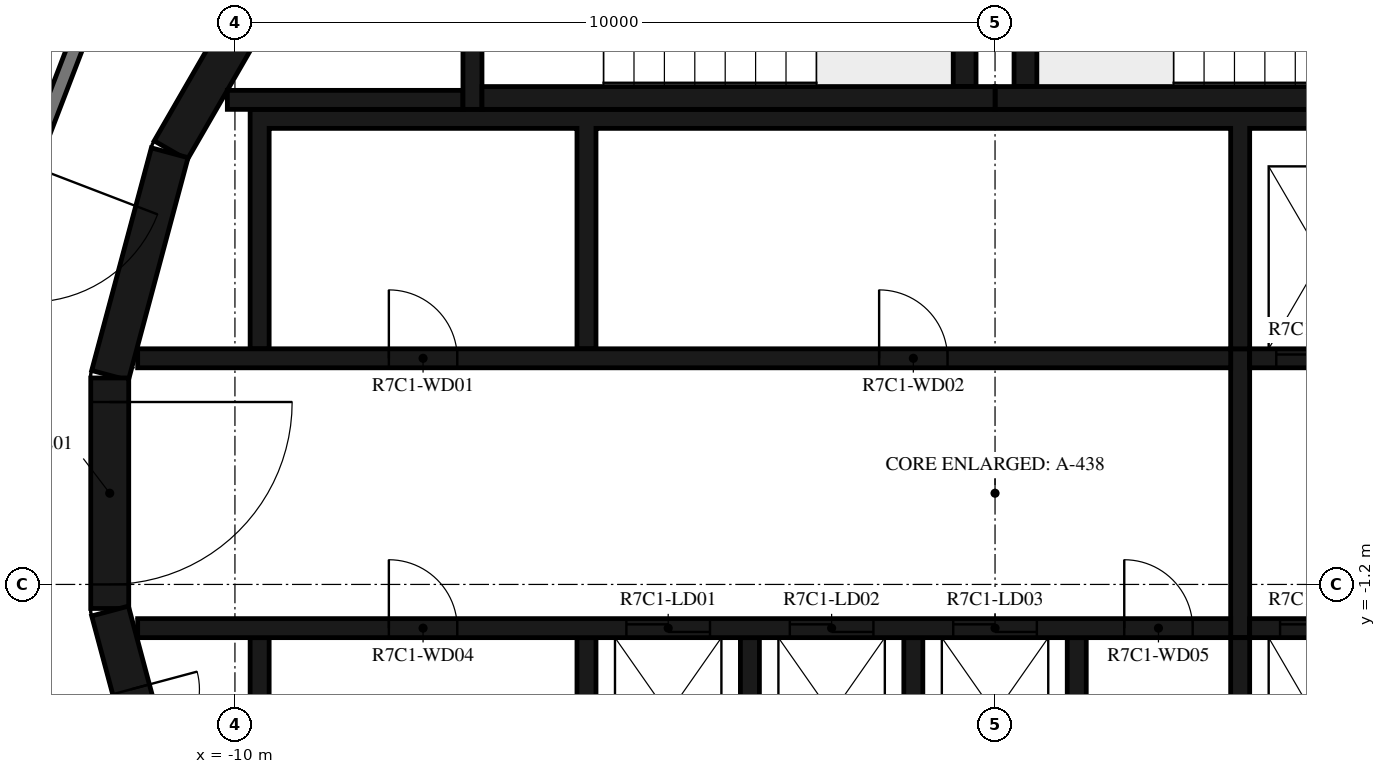
"""IFC4 building model, lengths in metres.
Left out: names, types, materials, properties, quantities, classifications, styles, units other than length and angle.
Written with IfcOpenShell. Run it as: python <this file> out.ifc"""

import sys

from ifc_helpers import new_model, si_unit, direction, frame, frame_2d, origin, place, context, subcontext, project, spatial, polyline, rectangle, outline, extrude, element, fill, save


model = new_model("IFC4")
c1 = context("Model", 3, precision=1e-05, world=origin(), true_north=direction((0.0, 1.0)))
c2 = subcontext(c1, "Body", "Model", "MODEL_VIEW")
j1 = project(units=[si_unit("LENGTHUNIT", "METRE"), si_unit("PLANEANGLEUNIT", "RADIAN")], contexts=[c1])
p1 = place(None, origin())
s1 = spatial("IfcSite", under=j1, at=p1, CompositionType="ELEMENT")
p2 = place(p1, origin())
s2 = spatial("IfcBuilding", under=s1, at=p2, CompositionType="ELEMENT")
p3 = place(p2, frame((0.0, 0.0, 287.9)))
s3 = spatial("IfcBuildingStorey", under=s2, at=p3, CompositionType="ELEMENT", Elevation=287.9)
for number, where, z_axis, x_axis in (
    (1, (-9.329, 7.137, 0.0), (0.0, 0.0, 1.0), (-0.5, -0.866, 0.0)),
    (2, (-10.858, 4.479, 0.0), (0.0, 0.0, 1.0), (-0.259, -0.966, 0.0)),
):
    element("IfcWall", number, at=place(p3, frame(where, z_axis=z_axis, x_axis=x_axis)), inside=s3, PredefinedType="SHEAR", context=c2, shape_type="SweptSolid", body=[
        extrude(rectangle(XDim=3.033, YDim=0.5, at=frame_2d((1.516, 0.0))), origin(), (0.0, 0.0, 1.0), 3.05),
    ])
p4 = place(p3, frame((-11.647, 1.516, 0.0), z_axis=(0.0, 0.0, 1.0), x_axis=(0.0, -1.0, 0.0)))
e3 = element("IfcWall", 3, at=p4, inside=s3, PredefinedType="SHEAR", context=c2, shape_type="SweptSolid", body=[
    extrude(rectangle(XDim=3.033, YDim=0.5, at=frame_2d((1.516, 0.0))), origin(), (0.0, 0.0, 1.0), 3.05),
])
p5 = place(p4, frame((0.316, 0.0, 0.0)))
e4 = element("IfcOpeningElement", 4, at=p5, cuts=e3, PredefinedType="OPENING", context=c2, shape_type="SweptSolid", body=[
    extrude(rectangle(XDim=2.4, YDim=2.1, at=frame_2d((1.2, 1.05))), frame((0.0, 0.26, 0.0), z_axis=(0.0, -1.0, 0.0), x_axis=(1.0, 0.0, 0.0)), (0.0, 0.0, 1.0), 0.52),
])
p6 = place(p3, frame((-11.643, -1.55, 0.0), z_axis=(0.0, 0.0, 1.0), x_axis=(0.258734743916, -0.965948410781, 0.0)))
e5 = element("IfcWall", 5, at=p6, inside=s3, PredefinedType="SHEAR", context=c2, shape_type="SweptSolid", body=[
    extrude(rectangle(XDim=3.033, YDim=0.5, at=frame_2d((1.516, 0.0))), origin(), (0.0, 0.0, 1.0), 3.05),
])
p7 = place(p6, frame((1.066, 0.0, 0.0)))
e6 = element("IfcOpeningElement", 6, at=p7, cuts=e5, PredefinedType="OPENING", context=c2, shape_type="SweptSolid", body=[
    extrude(rectangle(XDim=0.9, YDim=2.1, at=frame_2d((0.45, 1.05))), frame((0.0, 0.26, 0.0), z_axis=(0.0, -1.0, 0.0), x_axis=(1.0, 0.0, 0.0)), (0.0, 0.0, 1.0), 0.52),
])
p8 = place(p3, frame((0.0, 5.2, 0.0), z_axis=(0.0, 0.0, 1.0), x_axis=(1.0, 0.0, 0.0)))
e7 = element("IfcWall", 7, at=p8, inside=s3, PredefinedType="SHEAR", context=c2, shape_type="SweptSolid", body=[
    extrude(rectangle(XDim=6.75, YDim=0.3, at=frame_2d((3.375, 0.0))), origin(), (0.0, 0.0, 1.0), 3.05),
])
p9 = place(p3, frame((0.4, 5.35, 0.0), z_axis=(0.0, 0.0, 1.0), x_axis=(0.0, 1.0, 0.0)))
e8 = element("IfcWall", 8, at=p9, inside=s3, PredefinedType="SHEAR", context=c2, shape_type="SweptSolid", body=[
    extrude(rectangle(XDim=3.32, YDim=0.3, at=frame_2d((1.66, 0.0))), origin(), (0.0, 0.0, 1.0), 3.05),
])
p10 = place(p3, frame((-6.75, 5.2, 0.0), z_axis=(0.0, 0.0, 1.0), x_axis=(1.0, 0.0, 0.0)))
e9 = element("IfcWall", 9, at=p10, inside=s3, PredefinedType="SHEAR", context=c2, shape_type="SweptSolid", body=[
    extrude(rectangle(XDim=6.75, YDim=0.3, at=frame_2d((3.375, 0.0))), origin(), (0.0, 0.0, 1.0), 3.05),
])
p11 = place(p3, frame((-0.4, 5.35, 0.0), z_axis=(0.0, 0.0, 1.0), x_axis=(0.0, 1.0, 0.0)))
e10 = element("IfcWall", 10, at=p11, inside=s3, PredefinedType="SHEAR", context=c2, shape_type="SweptSolid", body=[
    extrude(rectangle(XDim=3.32, YDim=0.3, at=frame_2d((1.66, 0.0))), origin(), (0.0, 0.0, 1.0), 3.05),
])
p12 = place(p3, frame((-6.875, 8.97, 0.0), z_axis=(0.0, 0.0, 1.0), x_axis=(0.0, -1.0, 0.0)))
e11 = element("IfcWall", 11, at=p12, inside=s3, PredefinedType="SHEAR", context=c2, shape_type="SweptSolid", body=[
    extrude(rectangle(XDim=3.92, YDim=0.25, at=frame_2d((1.96, 0.0))), origin(), (0.0, 0.0, 1.0), 3.05),
])
p13 = place(p12, frame((1.61, 0.0, 0.0)))
e12 = element("IfcOpeningElement", 12, at=p13, cuts=e11, PredefinedType="OPENING", context=c2, shape_type="SweptSolid", body=[
    extrude(rectangle(XDim=1.2, YDim=2.1, at=frame_2d((0.6, 1.05))), frame((0.0, 0.135, 0.0), z_axis=(0.0, -1.0, 0.0), x_axis=(1.0, 0.0, 0.0)), (0.0, 0.0, 1.0), 0.27),
])
p14 = place(p3, frame((-7.0, 5.175, 0.0), z_axis=(0.0, 0.0, 1.0), x_axis=(-1.0, 0.0, 0.0)))
e13 = element("IfcWall", 13, at=p14, inside=s3, PredefinedType="SHEAR", context=c2, shape_type="SweptSolid", body=[
    extrude(rectangle(XDim=3.1, YDim=0.25, at=frame_2d((1.55, 0.0))), origin(), (0.0, 0.0, 1.0), 3.05),
])
p15 = place(p3, origin())
e14 = element("IfcWall", 14, at=p15, inside=s3, PredefinedType="SHEAR", context=c2, shape_type="SweptSolid", body=[
    extrude(outline(polyline([(-9.8, 1.9), (-9.55, 1.9), (-9.55, 4.8), (-5.5, 4.8), (-5.5, 1.9), (-5.25, 1.9), (-5.25, 4.8), (3.1, 4.8), (3.1, 1.9), (3.35, 1.9), (3.35, 4.8), (5.25, 4.8), (5.25, 1.9), (5.5, 1.9), (5.5, 4.8), (7.4, 4.8), (7.4, 1.9), (7.65, 1.9), (7.65, 4.8), (9.55, 4.8), (9.55, 1.9), (9.8, 1.9), (9.8, 4.8), (9.8, 5.05), (-9.8, 5.05), (-9.8, 4.8), (-9.8, 1.9)])), origin(), (0.0, 0.0, 1.0), 3.05),
])
p16 = place(p3, origin())
e15 = element("IfcWall", 15, at=p16, inside=s3, PredefinedType="SHEAR", context=c2, shape_type="SweptSolid", body=[
    extrude(outline(polyline([(9.8, -5.05), (9.8, -4.8), (9.8, -1.9), (9.55, -1.9), (9.55, -4.8), (7.65, -4.8), (7.65, -1.9), (7.4, -1.9), (7.4, -4.8), (5.5, -4.8), (5.5, -1.9), (5.25, -1.9), (5.25, -4.8), (3.35, -4.8), (3.35, -1.9), (3.1, -1.9), (3.1, -4.8), (1.2, -4.8), (1.2, -1.9), (0.95, -1.9), (0.95, -4.8), (-0.95, -4.8), (-0.95, -1.9), (-1.2, -1.9), (-1.2, -4.8), (-3.1, -4.8), (-3.1, -1.9), (-3.35, -1.9), (-3.35, -4.8), (-5.25, -4.8), (-5.25, -1.9), (-5.5, -1.9), (-5.5, -4.8), (-9.55, -4.8), (-9.55, -1.9), (-9.8, -1.9), (-9.8, -4.8), (-9.8, -5.05), (9.8, -5.05)])), origin(), (0.0, 0.0, 1.0), 3.05),
])
p17 = place(p3, frame((-11.28, 1.775, 0.0), z_axis=(0.0, 0.0, 1.0), x_axis=(1.0, 0.0, 0.0)))
e16 = element("IfcWall", 16, at=p17, inside=s3, PredefinedType="SHEAR", context=c2, shape_type="SweptSolid", body=[
    extrude(rectangle(XDim=14.38, YDim=0.25, at=frame_2d((7.19, 0.0))), origin(), (0.0, 0.0, 1.0), 3.05),
])
p18 = place(p17, frame((3.305, 0.0, 0.0)))
e17 = element("IfcOpeningElement", 17, at=p18, cuts=e16, PredefinedType="OPENING", context=c2, shape_type="SweptSolid", body=[
    extrude(rectangle(XDim=0.9, YDim=2.1, at=frame_2d((0.45, 1.05))), frame((0.0, 0.135, 0.0), z_axis=(0.0, -1.0, 0.0), x_axis=(1.0, 0.0, 0.0)), (0.0, 0.0, 1.0), 0.27),
])
p19 = place(p17, frame((9.755, 0.0, 0.0)))
e18 = element("IfcOpeningElement", 18, at=p19, cuts=e16, PredefinedType="OPENING", context=c2, shape_type="SweptSolid", body=[
    extrude(rectangle(XDim=0.9, YDim=2.1, at=frame_2d((0.45, 1.05))), frame((0.0, 0.135, 0.0), z_axis=(0.0, -1.0, 0.0), x_axis=(1.0, 0.0, 0.0)), (0.0, 0.0, 1.0), 0.27),
])
p20 = place(p3, frame((3.35, 1.775, 0.0), z_axis=(0.0, 0.0, 1.0), x_axis=(1.0, 0.0, 0.0)))
e19 = element("IfcWall", 19, at=p20, inside=s3, PredefinedType="SHEAR", context=c2, shape_type="SweptSolid", body=[
    extrude(rectangle(XDim=7.93, YDim=0.25, at=frame_2d((3.965, 0.0))), origin(), (0.0, 0.0, 1.0), 3.05),
])
p21 = place(p20, frame((0.35, 0.0, 0.0)))
e20 = element("IfcOpeningElement", 20, at=p21, cuts=e19, PredefinedType="OPENING", context=c2, shape_type="SweptSolid", body=[
    extrude(rectangle(XDim=1.2, YDim=2.4, at=frame_2d((0.6, 1.2))), frame((0.0, 0.135, 0.0), z_axis=(0.0, -1.0, 0.0), x_axis=(1.0, 0.0, 0.0)), (0.0, 0.0, 1.0), 0.27),
])
p22 = place(p20, frame((2.5, 0.0, 0.0)))
e21 = element("IfcOpeningElement", 21, at=p22, cuts=e19, PredefinedType="OPENING", context=c2, shape_type="SweptSolid", body=[
    extrude(rectangle(XDim=1.2, YDim=2.4, at=frame_2d((0.6, 1.2))), frame((0.0, 0.135, 0.0), z_axis=(0.0, -1.0, 0.0), x_axis=(1.0, 0.0, 0.0)), (0.0, 0.0, 1.0), 0.27),
])
p23 = place(p20, frame((4.8, 0.0, 0.0)))
e22 = element("IfcOpeningElement", 22, at=p23, cuts=e19, PredefinedType="OPENING", context=c2, shape_type="SweptSolid", body=[
    extrude(rectangle(XDim=0.9, YDim=2.1, at=frame_2d((0.45, 1.05))), frame((0.0, 0.135, 0.0), z_axis=(0.0, -1.0, 0.0), x_axis=(1.0, 0.0, 0.0)), (0.0, 0.0, 1.0), 0.27),
])
p24 = place(p3, frame((-11.28, -1.775, 0.0), z_axis=(0.0, 0.0, 1.0), x_axis=(1.0, 0.0, 0.0)))
e23 = element("IfcWall", 23, at=p24, inside=s3, PredefinedType="SHEAR", context=c2, shape_type="SweptSolid", body=[
    extrude(rectangle(XDim=14.38, YDim=0.25, at=frame_2d((7.19, 0.0))), origin(), (0.0, 0.0, 1.0), 3.05),
])
p25 = place(p24, frame((6.43, 0.0, 0.0)))
e24 = element("IfcOpeningElement", 24, at=p25, cuts=e23, PredefinedType="OPENING", context=c2, shape_type="SweptSolid", body=[
    extrude(rectangle(XDim=1.1, YDim=2.1, at=frame_2d((0.55, 1.05))), frame((0.0, 0.135, 0.0), z_axis=(0.0, -1.0, 0.0), x_axis=(1.0, 0.0, 0.0)), (0.0, 0.0, 1.0), 0.27),
])
p26 = place(p24, frame((8.58, 0.0, 0.0)))
e25 = element("IfcOpeningElement", 25, at=p26, cuts=e23, PredefinedType="OPENING", context=c2, shape_type="SweptSolid", body=[
    extrude(rectangle(XDim=1.1, YDim=2.1, at=frame_2d((0.55, 1.05))), frame((0.0, 0.135, 0.0), z_axis=(0.0, -1.0, 0.0), x_axis=(1.0, 0.0, 0.0)), (0.0, 0.0, 1.0), 0.27),
])
p27 = place(p24, frame((10.73, 0.0, 0.0)))
e26 = element("IfcOpeningElement", 26, at=p27, cuts=e23, PredefinedType="OPENING", context=c2, shape_type="SweptSolid", body=[
    extrude(rectangle(XDim=1.1, YDim=2.1, at=frame_2d((0.55, 1.05))), frame((0.0, 0.135, 0.0), z_axis=(0.0, -1.0, 0.0), x_axis=(1.0, 0.0, 0.0)), (0.0, 0.0, 1.0), 0.27),
])
p28 = place(p24, frame((3.305, 0.0, 0.0)))
e27 = element("IfcOpeningElement", 27, at=p28, cuts=e23, PredefinedType="OPENING", context=c2, shape_type="SweptSolid", body=[
    extrude(rectangle(XDim=0.9, YDim=2.1, at=frame_2d((0.45, 1.05))), frame((0.0, 0.135, 0.0), z_axis=(0.0, -1.0, 0.0), x_axis=(1.0, 0.0, 0.0)), (0.0, 0.0, 1.0), 0.27),
])
p29 = place(p24, frame((12.98, 0.0, 0.0)))
e28 = element("IfcOpeningElement", 28, at=p29, cuts=e23, PredefinedType="OPENING", context=c2, shape_type="SweptSolid", body=[
    extrude(rectangle(XDim=0.9, YDim=2.1, at=frame_2d((0.45, 1.05))), frame((0.0, 0.135, 0.0), z_axis=(0.0, -1.0, 0.0), x_axis=(1.0, 0.0, 0.0)), (0.0, 0.0, 1.0), 0.27),
])
p30 = place(p3, frame((3.35, -1.775, 0.0), z_axis=(0.0, 0.0, 1.0), x_axis=(1.0, 0.0, 0.0)))
e29 = element("IfcWall", 29, at=p30, inside=s3, PredefinedType="SHEAR", context=c2, shape_type="SweptSolid", body=[
    extrude(rectangle(XDim=7.93, YDim=0.25, at=frame_2d((3.965, 0.0))), origin(), (0.0, 0.0, 1.0), 3.05),
])
p31 = place(p30, frame((0.4, 0.0, 0.0)))
e30 = element("IfcOpeningElement", 30, at=p31, cuts=e29, PredefinedType="OPENING", context=c2, shape_type="SweptSolid", body=[
    extrude(rectangle(XDim=1.1, YDim=2.4, at=frame_2d((0.55, 1.2))), frame((0.0, 0.135, 0.0), z_axis=(0.0, -1.0, 0.0), x_axis=(1.0, 0.0, 0.0)), (0.0, 0.0, 1.0), 0.27),
])
p32 = place(p30, frame((2.55, 0.0, 0.0)))
e31 = element("IfcOpeningElement", 31, at=p32, cuts=e29, PredefinedType="OPENING", context=c2, shape_type="SweptSolid", body=[
    extrude(rectangle(XDim=1.1, YDim=2.4, at=frame_2d((0.55, 1.2))), frame((0.0, 0.135, 0.0), z_axis=(0.0, -1.0, 0.0), x_axis=(1.0, 0.0, 0.0)), (0.0, 0.0, 1.0), 0.27),
])
p33 = place(p30, frame((4.7, 0.0, 0.0)))
e32 = element("IfcOpeningElement", 32, at=p33, cuts=e29, PredefinedType="OPENING", context=c2, shape_type="SweptSolid", body=[
    extrude(rectangle(XDim=1.1, YDim=2.4, at=frame_2d((0.55, 1.2))), frame((0.0, 0.135, 0.0), z_axis=(0.0, -1.0, 0.0), x_axis=(1.0, 0.0, 0.0)), (0.0, 0.0, 1.0), 0.27),
])
p34 = place(p3, frame((3.225, -1.9, 0.0), z_axis=(0.0, 0.0, 1.0), x_axis=(0.0, 1.0, 0.0)))
e33 = element("IfcWall", 33, at=p34, inside=s3, PredefinedType="SHEAR", context=c2, shape_type="SweptSolid", body=[
    extrude(rectangle(XDim=3.8, YDim=0.25, at=frame_2d((1.9, 0.0))), origin(), (0.0, 0.0, 1.0), 3.05),
])
p35 = place(p3, frame((-11.223, 8.154, 0.0), z_axis=(0.0, 0.0, 1.0), x_axis=(-0.358341090983, -0.93359073609, 0.0)))
e34 = element("IfcWall", 34, at=p35, inside=s3, PredefinedType="STANDARD", context=c2, shape_type="SweptSolid", body=[
    extrude(rectangle(XDim=7.181, YDim=0.2, at=frame_2d((3.59, 0.0))), origin(), (0.0, 0.0, 1.0), 3.05),
])
p36 = place(p35, frame((4.114, 0.0, 0.0)))
e35 = element("IfcOpeningElement", 35, at=p36, cuts=e34, PredefinedType="OPENING", context=c2, shape_type="SweptSolid", body=[
    extrude(rectangle(XDim=1.8, YDim=2.1, at=frame_2d((0.9, 1.05))), frame((0.0, 0.11, 0.0), z_axis=(0.0, -1.0, 0.0), x_axis=(1.0, 0.0, 0.0)), (0.0, 0.0, 1.0), 0.22),
])
p37 = place(p5, origin())
e36 = element("IfcDoor", 36, at=p37, inside=s3, OperationType="DOUBLE_DOOR_SINGLE_SWING", PredefinedType="DOOR", context=c2, shape_type="SweptSolid", body=[
    extrude(rectangle(XDim=2.4, YDim=2.1, at=frame_2d((1.2, 1.05))), frame((0.0, 0.025, 0.0), z_axis=(0.0, -1.0, 0.0), x_axis=(1.0, 0.0, 0.0)), (0.0, 0.0, 1.0), 0.05),
])
fill(e4, e36)
p38 = place(p21, origin())
e37 = element("IfcDoor", 37, at=p38, inside=s3, OperationType="DOUBLE_DOOR_SLIDING", PredefinedType="DOOR", context=c2, shape_type="SweptSolid", body=[
    extrude(rectangle(XDim=1.2, YDim=2.4, at=frame_2d((0.6, 1.2))), frame((0.0, 0.025, 0.0), z_axis=(0.0, -1.0, 0.0), x_axis=(1.0, 0.0, 0.0)), (0.0, 0.0, 1.0), 0.05),
])
fill(e20, e37)
p39 = place(p25, origin())
e38 = element("IfcDoor", 38, at=p39, inside=s3, OperationType="DOUBLE_DOOR_SLIDING", PredefinedType="DOOR", context=c2, shape_type="SweptSolid", body=[
    extrude(rectangle(XDim=1.1, YDim=2.1, at=frame_2d((0.55, 1.05))), frame((0.0, 0.025, 0.0), z_axis=(0.0, -1.0, 0.0), x_axis=(1.0, 0.0, 0.0)), (0.0, 0.0, 1.0), 0.05),
])
fill(e24, e38)
p40 = place(p26, origin())
e39 = element("IfcDoor", 39, at=p40, inside=s3, OperationType="DOUBLE_DOOR_SLIDING", PredefinedType="DOOR", context=c2, shape_type="SweptSolid", body=[
    extrude(rectangle(XDim=1.1, YDim=2.1, at=frame_2d((0.55, 1.05))), frame((0.0, 0.025, 0.0), z_axis=(0.0, -1.0, 0.0), x_axis=(1.0, 0.0, 0.0)), (0.0, 0.0, 1.0), 0.05),
])
fill(e25, e39)
p41 = place(p27, origin())
e40 = element("IfcDoor", 40, at=p41, inside=s3, OperationType="DOUBLE_DOOR_SLIDING", PredefinedType="DOOR", context=c2, shape_type="SweptSolid", body=[
    extrude(rectangle(XDim=1.1, YDim=2.1, at=frame_2d((0.55, 1.05))), frame((0.0, 0.025, 0.0), z_axis=(0.0, -1.0, 0.0), x_axis=(1.0, 0.0, 0.0)), (0.0, 0.0, 1.0), 0.05),
])
fill(e26, e40)
p42 = place(p31, origin())
e41 = element("IfcDoor", 41, at=p42, inside=s3, OperationType="DOUBLE_DOOR_SLIDING", PredefinedType="DOOR", context=c2, shape_type="SweptSolid", body=[
    extrude(rectangle(XDim=1.1, YDim=2.4, at=frame_2d((0.55, 1.2))), frame((0.0, 0.025, 0.0), z_axis=(0.0, -1.0, 0.0), x_axis=(1.0, 0.0, 0.0)), (0.0, 0.0, 1.0), 0.05),
])
fill(e30, e41)
p43 = place(p18, origin())
e42 = element("IfcDoor", 42, at=p43, inside=s3, OperationType="SINGLE_SWING_LEFT", PredefinedType="DOOR", context=c2, shape_type="SweptSolid", body=[
    extrude(rectangle(XDim=0.9, YDim=2.1, at=frame_2d((0.45, 1.05))), frame((0.0, 0.025, 0.0), z_axis=(0.0, -1.0, 0.0), x_axis=(1.0, 0.0, 0.0)), (0.0, 0.0, 1.0), 0.05),
])
fill(e17, e42)
p44 = place(p19, origin())
e43 = element("IfcDoor", 43, at=p44, inside=s3, OperationType="SINGLE_SWING_RIGHT", PredefinedType="DOOR", context=c2, shape_type="SweptSolid", body=[
    extrude(rectangle(XDim=0.9, YDim=2.1, at=frame_2d((0.45, 1.05))), frame((0.0, 0.025, 0.0), z_axis=(0.0, -1.0, 0.0), x_axis=(1.0, 0.0, 0.0)), (0.0, 0.0, 1.0), 0.05),
])
fill(e18, e43)
p45 = place(p28, origin())
e44 = element("IfcDoor", 44, at=p45, inside=s3, OperationType="SINGLE_SWING_RIGHT", PredefinedType="DOOR", context=c2, shape_type="SweptSolid", body=[
    extrude(rectangle(XDim=0.9, YDim=2.1, at=frame_2d((0.45, 1.05))), frame((0.0, 0.025, 0.0), z_axis=(0.0, -1.0, 0.0), x_axis=(1.0, 0.0, 0.0)), (0.0, 0.0, 1.0), 0.05),
])
fill(e27, e44)
p46 = place(p29, origin())
e45 = element("IfcDoor", 45, at=p46, inside=s3, OperationType="SINGLE_SWING_LEFT", PredefinedType="DOOR", context=c2, shape_type="SweptSolid", body=[
    extrude(rectangle(XDim=0.9, YDim=2.1, at=frame_2d((0.45, 1.05))), frame((0.0, 0.025, 0.0), z_axis=(0.0, -1.0, 0.0), x_axis=(1.0, 0.0, 0.0)), (0.0, 0.0, 1.0), 0.05),
])
fill(e28, e45)
p47 = place(p7, origin())
e46 = element("IfcDoor", 46, at=p47, inside=s3, OperationType="SINGLE_SWING_RIGHT", PredefinedType="DOOR", context=c2, shape_type="SweptSolid", body=[
    extrude(rectangle(XDim=0.9, YDim=2.1, at=frame_2d((0.45, 1.05))), frame((0.0, 0.025, 0.0), z_axis=(0.0, -1.0, 0.0), x_axis=(1.0, 0.0, 0.0)), (0.0, 0.0, 1.0), 0.05),
])
fill(e6, e46)
save(model, sys.argv[1])
